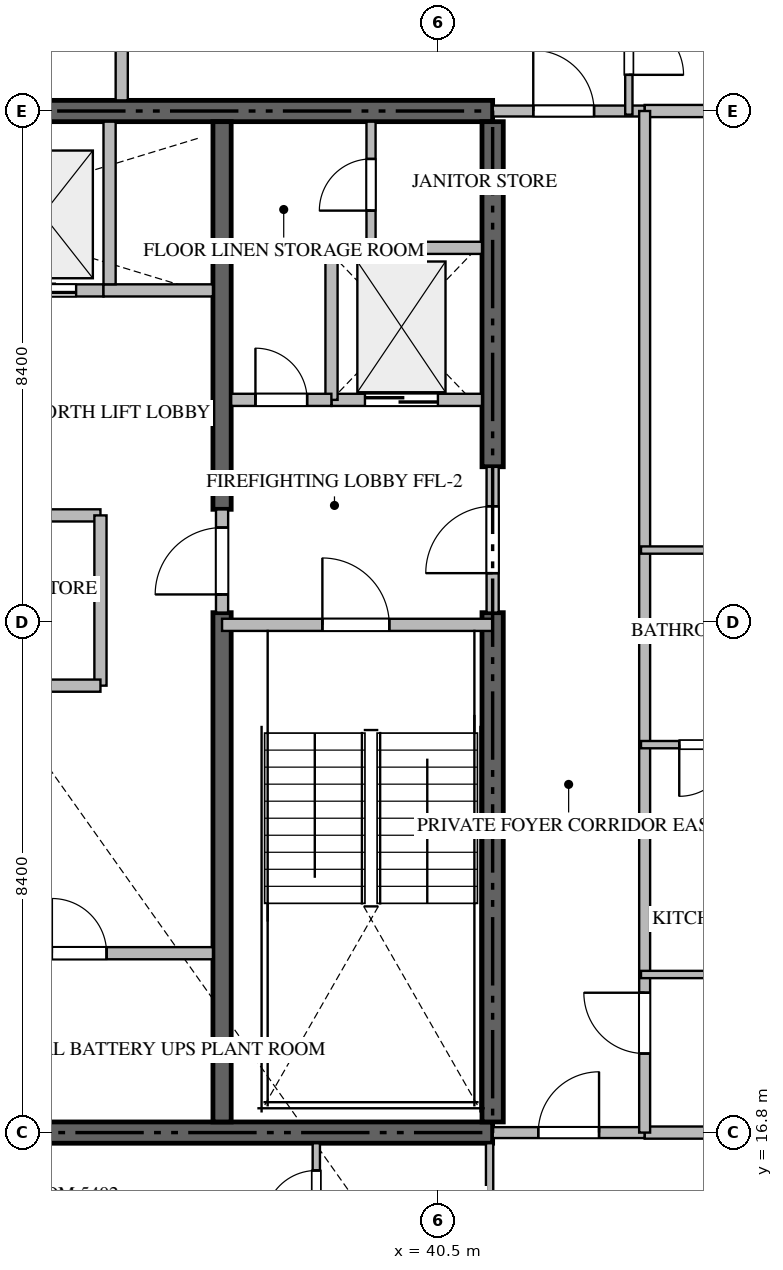
"""IFC4 building model, lengths in metres.
Left out: names, types, materials, properties, quantities, classifications, styles, units other than length and angle.
Written with IfcOpenShell. Run it as: python <this file> out.ifc"""

import sys

from ifc_helpers import new_model, si_unit, direction, frame, frame_2d, origin, place, context, subcontext, project, spatial, rectangle, extrude, source, transform, mapped, element, fill, save


model = new_model("IFC4")
c1 = context("Model", 3, precision=1e-05, world=origin(), true_north=direction((0.0, 1.0)))
c2 = subcontext(c1, "Body", "Model", "MODEL_VIEW")
j1 = project(units=[si_unit("LENGTHUNIT", "METRE"), si_unit("PLANEANGLEUNIT", "RADIAN")], contexts=[c1])
p1 = place(None, origin())
s1 = spatial("IfcSite", under=j1, at=p1, CompositionType="ELEMENT")
p2 = place(p1, origin())
s2 = spatial("IfcBuilding", under=s1, at=p2, CompositionType="ELEMENT")
p3 = place(p2, frame((0.0, 0.0, 218.15)))
s3 = spatial("IfcBuildingStorey", under=s2, at=p3, CompositionType="ELEMENT", Elevation=218.15)
for number, where, z_axis, x_axis in (
    (1, (23.4, 16.8, -0.26), (0.0, 0.0, 1.0), (1.0, 0.0, 0.0)),
    (2, (41.4, 33.6, -0.26), (0.0, 0.0, 1.0), (-1.0, 0.0, 0.0)),
):
    element("IfcWall", number, at=place(p3, frame(where, z_axis=z_axis, x_axis=x_axis)), inside=s3, PredefinedType="SHEAR", context=c2, shape_type="SweptSolid", body=[
        extrude(rectangle(XDim=18.0, YDim=0.35, at=frame_2d((9.0, 0.0))), origin(), (0.0, 0.0, 1.0), 3.848),
    ])
p4 = place(p3, frame((41.4, 16.975, -0.26), z_axis=(0.0, 0.0, 1.0), x_axis=(0.0, 1.0, 0.0)))
e3 = element("IfcWall", 3, at=p4, inside=s3, PredefinedType="SHEAR", context=c2, shape_type="SweptSolid", body=[
    extrude(rectangle(XDim=8.375, YDim=0.35, at=frame_2d((4.188, 0.0))), origin(), (0.0, 0.0, 1.0), 3.848),
])
p5 = place(p3, frame((41.4, 27.75, -0.26), z_axis=(0.0, 0.0, 1.0), x_axis=(0.0, 1.0, 0.0)))
e4 = element("IfcWall", 4, at=p5, inside=s3, PredefinedType="SHEAR", context=c2, shape_type="SweptSolid", body=[
    extrude(rectangle(XDim=5.675, YDim=0.35, at=frame_2d((2.837, 0.0))), origin(), (0.0, 0.0, 1.0), 3.848),
])
p6 = place(p3, frame((36.95, 16.975, -0.26), z_axis=(0.0, 0.0, 1.0), x_axis=(0.0, 1.0, 0.0)))
e5 = element("IfcWall", 5, at=p6, inside=s3, PredefinedType="SHEAR", context=c2, shape_type="SweptSolid", body=[
    extrude(rectangle(XDim=8.375, YDim=0.3, at=frame_2d((4.188, 0.0))), origin(), (0.0, 0.0, 1.0), 3.848),
])
p7 = place(p3, frame((36.95, 27.05, -0.26), z_axis=(0.0, 0.0, 1.0), x_axis=(0.0, 1.0, 0.0)))
e6 = element("IfcWall", 6, at=p7, inside=s3, PredefinedType="SHEAR", context=c2, shape_type="SweptSolid", body=[
    extrude(rectangle(XDim=6.375, YDim=0.3, at=frame_2d((3.188, 0.0))), origin(), (0.0, 0.0, 1.0), 3.848),
])
p8 = place(p3, frame((36.95, 25.15, 0.0), z_axis=(0.0, 0.0, 1.0), x_axis=(1.0, 0.0, 0.0)))
e7 = element("IfcWall", 7, at=p8, inside=s3, PredefinedType="STANDARD", context=c2, shape_type="SweptSolid", body=[
    extrude(rectangle(XDim=4.45, YDim=0.2, at=frame_2d((2.225, 0.0))), origin(), (0.0, 0.0, 1.0), 3.59),
])
p9 = place(p8, frame((1.65, 0.0, 0.0)))
e8 = element("IfcOpeningElement", 8, at=p9, cuts=e7, PredefinedType="OPENING", context=c2, shape_type="SweptSolid", body=[
    extrude(rectangle(XDim=1.1, YDim=2.15, at=frame_2d((0.55, 1.075))), frame((0.0, 0.11, 0.0), z_axis=(0.0, -1.0, 0.0), x_axis=(1.0, 0.0, 0.0)), (0.0, 0.0, 1.0), 0.22),
])
p10 = place(p3, frame((38.75, 28.85, 0.0), z_axis=(0.0, 0.0, 1.0), x_axis=(1.0, 0.0, 0.0)))
e9 = element("IfcWall", 9, at=p10, inside=s3, PredefinedType="STANDARD", context=c2, shape_type="SweptSolid", body=[
    extrude(rectangle(XDim=2.475, YDim=0.2, at=frame_2d((1.238, 0.0))), origin(), (0.0, 0.0, 1.0), 3.59),
])
p11 = place(p10, frame((0.55, 0.0, 0.0)))
e10 = element("IfcOpeningElement", 10, at=p11, cuts=e9, PredefinedType="OPENING", context=c2, shape_type="SweptSolid", body=[
    extrude(rectangle(XDim=1.2, YDim=2.2, at=frame_2d((0.6, 1.1))), frame((0.0, 0.11, 0.0), z_axis=(0.0, -1.0, 0.0), x_axis=(1.0, 0.0, 0.0)), (0.0, 0.0, 1.0), 0.22),
])
p12 = place(p3, frame((32.85, 30.65, 0.0), z_axis=(0.0, 0.0, 1.0), x_axis=(1.0, 0.0, 0.0)))
e11 = element("IfcWall", 11, at=p12, inside=s3, PredefinedType="STANDARD", context=c2, shape_type="SweptSolid", body=[
    extrude(rectangle(XDim=2.15, YDim=0.2, at=frame_2d((1.075, 0.0))), origin(), (0.0, 0.0, 1.0), 3.59),
])
p13 = place(p12, frame((0.6, 0.0, 0.0)))
e12 = element("IfcOpeningElement", 12, at=p13, cuts=e11, PredefinedType="OPENING", context=c2, shape_type="SweptSolid", body=[
    extrude(rectangle(XDim=1.1, YDim=2.2, at=frame_2d((0.55, 1.1))), frame((0.0, 0.11, 0.0), z_axis=(0.0, -1.0, 0.0), x_axis=(1.0, 0.0, 0.0)), (0.0, 0.0, 1.0), 0.22),
])
p14 = place(p3, frame((35.0, 30.65, 0.0), z_axis=(0.0, 0.0, 1.0), x_axis=(1.0, 0.0, 0.0)))
e13 = element("IfcWall", 13, at=p14, inside=s3, PredefinedType="STANDARD", context=c2, shape_type="SweptSolid", body=[
    extrude(rectangle(XDim=1.8, YDim=0.2, at=frame_2d((0.9, 0.0))), origin(), (0.0, 0.0, 1.0), 3.59),
])
p15 = place(p3, frame((35.1, 30.75, 0.0), z_axis=(0.0, 0.0, 1.0), x_axis=(0.0, 1.0, 0.0)))
e14 = element("IfcWall", 14, at=p15, inside=s3, PredefinedType="STANDARD", context=c2, shape_type="SweptSolid", body=[
    extrude(rectangle(XDim=2.675, YDim=0.2, at=frame_2d((1.337, 0.0))), origin(), (0.0, 0.0, 1.0), 3.59),
])
p16 = place(p3, frame((38.75, 28.85, 0.0), z_axis=(0.0, 0.0, 1.0), x_axis=(0.0, 1.0, 0.0)))
e15 = element("IfcWall", 15, at=p16, inside=s3, PredefinedType="STANDARD", context=c2, shape_type="SweptSolid", body=[
    extrude(rectangle(XDim=2.5, YDim=0.2, at=frame_2d((1.25, 0.0))), origin(), (0.0, 0.0, 1.0), 3.59),
])
p17 = place(p3, frame((38.75, 31.35, 0.0), z_axis=(0.0, 0.0, 1.0), x_axis=(1.0, 0.0, 0.0)))
e16 = element("IfcWall", 16, at=p17, inside=s3, PredefinedType="STANDARD", context=c2, shape_type="SweptSolid", body=[
    extrude(rectangle(XDim=2.475, YDim=0.2, at=frame_2d((1.238, 0.0))), origin(), (0.0, 0.0, 1.0), 3.59),
])
p18 = place(p3, frame((37.1, 28.85, 0.0), z_axis=(0.0, 0.0, 1.0), x_axis=(1.0, 0.0, 0.0)))
e17 = element("IfcWall", 17, at=p18, inside=s3, PredefinedType="STANDARD", context=c2, shape_type="SweptSolid", body=[
    extrude(rectangle(XDim=1.648, YDim=0.2, at=frame_2d((0.824, 0.0))), origin(), (0.0, 0.0, 1.0), 3.59),
])
p19 = place(p18, frame((0.399, 0.0, 0.0)))
e18 = element("IfcOpeningElement", 18, at=p19, cuts=e17, PredefinedType="OPENING", context=c2, shape_type="SweptSolid", body=[
    extrude(rectangle(XDim=0.85, YDim=2.1, at=frame_2d((0.425, 1.05))), frame((0.0, 0.11, 0.0), z_axis=(0.0, -1.0, 0.0), x_axis=(1.0, 0.0, 0.0)), (0.0, 0.0, 1.0), 0.22),
])
p20 = place(p3, frame((41.4, 25.352, 0.0), z_axis=(0.0, 0.0, 1.0), x_axis=(0.0, 1.0, 0.0)))
e19 = element("IfcWall", 19, at=p20, inside=s3, PredefinedType="STANDARD", context=c2, shape_type="SweptSolid", body=[
    extrude(rectangle(XDim=2.396, YDim=0.2, at=frame_2d((1.198, 0.0))), origin(), (0.0, 0.0, 1.0), 3.59),
])
p21 = place(p20, frame((0.648, 0.0, 0.0)))
e20 = element("IfcOpeningElement", 20, at=p21, cuts=e19, PredefinedType="OPENING", context=c2, shape_type="SweptSolid", body=[
    extrude(rectangle(XDim=1.1, YDim=2.15, at=frame_2d((0.55, 1.075))), frame((0.0, 0.11, 0.0), z_axis=(0.0, -1.0, 0.0), x_axis=(1.0, 0.0, 0.0)), (0.0, 0.0, 1.0), 0.22),
])
p22 = place(p3, frame((36.95, 25.352, 0.0), z_axis=(0.0, 0.0, 1.0), x_axis=(0.0, 1.0, 0.0)))
e21 = element("IfcWall", 21, at=p22, inside=s3, PredefinedType="STANDARD", context=c2, shape_type="SweptSolid", body=[
    extrude(rectangle(XDim=1.696, YDim=0.2, at=frame_2d((0.848, 0.0))), origin(), (0.0, 0.0, 1.0), 3.59),
])
p23 = place(p22, frame((0.298, 0.0, 0.0)))
e22 = element("IfcOpeningElement", 22, at=p23, cuts=e21, PredefinedType="OPENING", context=c2, shape_type="SweptSolid", body=[
    extrude(rectangle(XDim=1.1, YDim=2.15, at=frame_2d((0.55, 1.075))), frame((0.0, 0.11, 0.0), z_axis=(0.0, -1.0, 0.0), x_axis=(1.0, 0.0, 0.0)), (0.0, 0.0, 1.0), 0.22),
])
p24 = place(p3, frame((39.4, 31.35, 0.0), z_axis=(0.0, 0.0, 1.0), x_axis=(0.0, 1.0, 0.0)))
e23 = element("IfcWall", 23, at=p24, inside=s3, PredefinedType="PARTITIONING", context=c2, shape_type="SweptSolid", body=[
    extrude(rectangle(XDim=2.075, YDim=0.15, at=frame_2d((1.038, 0.0))), origin(), (0.0, 0.0, 1.0), 3.59),
])
p25 = place(p24, frame((0.612, 0.0, 0.0)))
e24 = element("IfcOpeningElement", 24, at=p25, cuts=e23, PredefinedType="OPENING", context=c2, shape_type="SweptSolid", body=[
    extrude(rectangle(XDim=0.85, YDim=2.1, at=frame_2d((0.425, 1.05))), frame((0.0, 0.085, 0.0), z_axis=(0.0, -1.0, 0.0), x_axis=(1.0, 0.0, 0.0)), (0.0, 0.0, 1.0), 0.17),
])
p26 = place(p3, frame((32.402, 19.75, 0.0), z_axis=(0.0, 0.0, 1.0), x_axis=(1.0, 0.0, 0.0)))
e25 = element("IfcWall", 25, at=p26, inside=s3, PredefinedType="STANDARD", context=c2, shape_type="SweptSolid", body=[
    extrude(rectangle(XDim=4.398, YDim=0.2, at=frame_2d((2.199, 0.0))), origin(), (0.0, 0.0, 1.0), 3.59),
])
p27 = place(p26, frame((1.749, 0.0, 0.0)))
e26 = element("IfcOpeningElement", 26, at=p27, cuts=e25, PredefinedType="OPENING", context=c2, shape_type="SweptSolid", body=[
    extrude(rectangle(XDim=0.9, YDim=2.1, at=frame_2d((0.45, 1.05))), frame((0.0, 0.11, 0.0), z_axis=(0.0, -1.0, 0.0), x_axis=(1.0, 0.0, 0.0)), (0.0, 0.0, 1.0), 0.22),
])
p28 = place(p3, frame((28.0, 26.95, 0.0), z_axis=(0.0, 0.0, 1.0), x_axis=(1.0, 0.0, 0.0)))
e27 = element("IfcWall", 27, at=p28, inside=s3, PredefinedType="STANDARD", context=c2, shape_type="SweptSolid", body=[
    extrude(rectangle(XDim=6.95, YDim=0.2, at=frame_2d((3.475, 0.0))), origin(), (0.0, 0.0, 1.0), 3.59),
])
p29 = place(p3, frame((34.95, 24.15, 0.0), z_axis=(0.0, 0.0, 1.0), x_axis=(0.0, 1.0, 0.0)))
e28 = element("IfcWall", 28, at=p29, inside=s3, PredefinedType="STANDARD", context=c2, shape_type="SweptSolid", body=[
    extrude(rectangle(XDim=2.8, YDim=0.2, at=frame_2d((1.4, 0.0))), origin(), (0.0, 0.0, 1.0), 3.59),
])
p30 = place(p3, frame((30.42, 24.15, 0.0), z_axis=(0.0, 0.0, 1.0), x_axis=(1.0, 0.0, 0.0)))
e29 = element("IfcWall", 29, at=p30, inside=s3, PredefinedType="STANDARD", context=c2, shape_type="SweptSolid", body=[
    extrude(rectangle(XDim=4.53, YDim=0.2, at=frame_2d((2.265, 0.0))), origin(), (0.0, 0.0, 1.0), 3.59),
])
p31 = place(p30, frame((1.815, 0.0, 0.0)))
e30 = element("IfcOpeningElement", 30, at=p31, cuts=e29, PredefinedType="OPENING", context=c2, shape_type="SweptSolid", body=[
    extrude(rectangle(XDim=0.9, YDim=2.1, at=frame_2d((0.45, 1.05))), frame((0.0, 0.11, 0.0), z_axis=(0.0, -1.0, 0.0), x_axis=(1.0, 0.0, 0.0)), (0.0, 0.0, 1.0), 0.22),
])
p32 = place(p3, frame((35.3, 33.775, 0.0), z_axis=(0.0, 0.0, 1.0), x_axis=(0.0, 1.0, 0.0)))
e31 = element("IfcWall", 31, at=p32, inside=s3, PredefinedType="PARTITIONING", context=c2, shape_type="SweptSolid", body=[
    extrude(rectangle(XDim=15.343, YDim=0.2, at=frame_2d((7.671, 0.0))), origin(), (0.0, 0.0, 1.0), 3.59),
])
for number, where, z_axis, x_axis in (
    (32, (43.9, 16.8, 0.0), (0.0, 0.0, 1.0), (1.0, 0.0, 0.0)),
    (33, (43.9, 33.6, 0.0), (0.0, 0.0, 1.0), (1.0, 0.0, 0.0)),
):
    element("IfcWall", number, at=place(p3, frame(where, z_axis=z_axis, x_axis=x_axis)), inside=s3, PredefinedType="PARTITIONING", context=c2, shape_type="SweptSolid", body=[
        extrude(rectangle(XDim=13.418, YDim=0.2, at=frame_2d((6.709, 0.0))), origin(), (0.0, 0.0, 1.0), 3.59),
    ])
p33 = place(p3, frame((41.402, 16.8, 0.0), z_axis=(0.0, 0.0, 1.0), x_axis=(1.0, 0.0, 0.0)))
e34 = element("IfcWall", 34, at=p33, inside=s3, PredefinedType="PARTITIONING", context=c2, shape_type="SweptSolid", body=[
    extrude(rectangle(XDim=2.496, YDim=0.18, at=frame_2d((1.248, 0.0))), origin(), (0.0, 0.0, 1.0), 3.59),
])
p34 = place(p33, frame((0.748, 0.0, 0.0)))
e35 = element("IfcOpeningElement", 35, at=p34, cuts=e34, PredefinedType="OPENING", context=c2, shape_type="SweptSolid", body=[
    extrude(rectangle(XDim=1.0, YDim=2.15, at=frame_2d((0.5, 1.075))), frame((0.0, 0.1, 0.0), z_axis=(0.0, -1.0, 0.0), x_axis=(1.0, 0.0, 0.0)), (0.0, 0.0, 1.0), 0.2),
])
p35 = place(p3, frame((41.402, 33.6, 0.0), z_axis=(0.0, 0.0, 1.0), x_axis=(1.0, 0.0, 0.0)))
e36 = element("IfcWall", 36, at=p35, inside=s3, PredefinedType="PARTITIONING", context=c2, shape_type="SweptSolid", body=[
    extrude(rectangle(XDim=2.496, YDim=0.18, at=frame_2d((1.248, 0.0))), origin(), (0.0, 0.0, 1.0), 3.59),
])
p36 = place(p35, frame((0.666, 0.0, 0.0)))
e37 = element("IfcOpeningElement", 37, at=p36, cuts=e36, PredefinedType="OPENING", context=c2, shape_type="SweptSolid", body=[
    extrude(rectangle(XDim=1.0, YDim=2.15, at=frame_2d((0.5, 1.075))), frame((0.0, 0.1, 0.0), z_axis=(0.0, -1.0, 0.0), x_axis=(1.0, 0.0, 0.0)), (0.0, 0.0, 1.0), 0.2),
])
p37 = place(p3, frame((43.9, 16.8, 0.0), z_axis=(0.0, 0.0, 1.0), x_axis=(0.0, 1.0, 0.0)))
e38 = element("IfcWall", 38, at=p37, inside=s3, PredefinedType="PARTITIONING", context=c2, shape_type="SweptSolid", body=[
    extrude(rectangle(XDim=16.8, YDim=0.18, at=frame_2d((8.4, 0.0))), origin(), (0.0, 0.0, 1.0), 3.59),
])
p38 = place(p37, frame((1.3, 0.0, 0.0)))
e39 = element("IfcOpeningElement", 39, at=p38, cuts=e38, PredefinedType="OPENING", context=c2, shape_type="SweptSolid", body=[
    extrude(rectangle(XDim=1.0, YDim=2.15, at=frame_2d((0.5, 1.075))), frame((0.0, 0.1, 0.0), z_axis=(0.0, -1.0, 0.0), x_axis=(1.0, 0.0, 0.0)), (0.0, 0.0, 1.0), 0.2),
])
p39 = place(p3, frame((41.35, 14.05, 0.0), z_axis=(0.0, 0.0, 1.0), x_axis=(0.0, 1.0, 0.0)))
e40 = element("IfcWall", 40, at=p39, inside=s3, PredefinedType="PARTITIONING", context=c2, shape_type="SweptSolid", body=[
    extrude(rectangle(XDim=2.575, YDim=0.12, at=frame_2d((1.288, 0.0))), origin(), (0.0, 0.0, 1.0), 3.59),
])
p40 = place(p3, frame((38.5, 14.752, 0.0), z_axis=(0.0, 0.0, 1.0), x_axis=(0.0, 1.0, 0.0)))
e41 = element("IfcWall", 41, at=p40, inside=s3, PredefinedType="PARTITIONING", context=c2, shape_type="SweptSolid", body=[
    extrude(rectangle(XDim=1.873, YDim=0.12, at=frame_2d((0.937, 0.0))), origin(), (0.0, 0.0, 1.0), 3.59),
])
p41 = place(p40, frame((0.575, 0.0, 0.0)))
e42 = element("IfcOpeningElement", 42, at=p41, cuts=e41, PredefinedType="OPENING", context=c2, shape_type="SweptSolid", body=[
    extrude(rectangle(XDim=0.85, YDim=2.1, at=frame_2d((0.425, 1.05))), frame((0.0, 0.07, 0.0), z_axis=(0.0, -1.0, 0.0), x_axis=(1.0, 0.0, 0.0)), (0.0, 0.0, 1.0), 0.14),
])
p42 = place(p3, frame((43.64, 35.75, 0.0), z_axis=(0.0, 0.0, 1.0), x_axis=(0.0, -1.0, 0.0)))
e43 = element("IfcWall", 43, at=p42, inside=s3, PredefinedType="PARTITIONING", context=c2, shape_type="SweptSolid", body=[
    extrude(rectangle(XDim=2.21, YDim=0.12, at=frame_2d((1.105, 0.0))), origin(), (0.0, 0.0, 1.0), 3.59),
])
p43 = place(p42, frame((0.655, 0.0, 0.0)))
e44 = element("IfcOpeningElement", 44, at=p43, cuts=e43, PredefinedType="OPENING", context=c2, shape_type="SweptSolid", body=[
    extrude(rectangle(XDim=0.9, YDim=2.1, at=frame_2d((0.45, 1.05))), frame((0.0, 0.07, 0.0), z_axis=(0.0, -1.0, 0.0), x_axis=(1.0, 0.0, 0.0)), (0.0, 0.0, 1.0), 0.14),
])
p44 = place(p3, frame((46.65, 19.4, 0.0), z_axis=(0.0, 0.0, 1.0), x_axis=(-1.0, 0.0, 0.0)))
e45 = element("IfcWall", 45, at=p44, inside=s3, PredefinedType="PARTITIONING", context=c2, shape_type="SweptSolid", body=[
    extrude(rectangle(XDim=2.81, YDim=0.12, at=frame_2d((1.405, 0.0))), origin(), (0.0, 0.0, 1.0), 3.59),
])
p45 = place(p3, frame((45.95, 26.38, 0.0), z_axis=(0.0, 0.0, 1.0), x_axis=(-1.0, 0.0, 0.0)))
e46 = element("IfcWall", 46, at=p45, inside=s3, PredefinedType="PARTITIONING", context=c2, shape_type="SweptSolid", body=[
    extrude(rectangle(XDim=2.11, YDim=0.12, at=frame_2d((1.055, 0.0))), origin(), (0.0, 0.0, 1.0), 3.59),
])
p46 = place(p3, frame((45.948, 23.18, 0.0), z_axis=(0.0, 0.0, 1.0), x_axis=(-1.0, 0.0, 0.0)))
e47 = element("IfcWall", 47, at=p46, inside=s3, PredefinedType="PARTITIONING", context=c2, shape_type="SweptSolid", body=[
    extrude(rectangle(XDim=2.108, YDim=0.12, at=frame_2d((1.054, 0.0))), origin(), (0.0, 0.0, 1.0), 3.59),
])
p47 = place(p46, frame((0.629, 0.0, 0.0)))
e48 = element("IfcOpeningElement", 48, at=p47, cuts=e47, PredefinedType="OPENING", context=c2, shape_type="SweptSolid", body=[
    extrude(rectangle(XDim=0.85, YDim=2.1, at=frame_2d((0.425, 1.05))), frame((0.0, 0.07, 0.0), z_axis=(0.0, -1.0, 0.0), x_axis=(1.0, 0.0, 0.0)), (0.0, 0.0, 1.0), 0.14),
])
m1 = source(origin(), c2, "Body", "SweptSolid", [
    extrude(rectangle(XDim=1.1, YDim=2.15, at=frame_2d((0.55, 1.075))), frame((0.0, 0.025, 0.0), z_axis=(0.0, -1.0, 0.0), x_axis=(1.0, 0.0, 0.0)), (0.0, 0.0, 1.0), 0.05),
])
p48 = place(p9, origin())
e49 = element("IfcDoor", 49, at=p48, inside=s3, OperationType="SINGLE_SWING_LEFT", PredefinedType="DOOR", context=c2, shape_type="MappedRepresentation", body=[
    mapped(m1, transform((0.0, 0.0, 0.0), scale=1.0)),
])
fill(e8, e49)
m2 = source(origin(), c2, "Body", "SweptSolid", [
    extrude(rectangle(XDim=1.2, YDim=2.2, at=frame_2d((0.6, 1.1))), frame((0.0, 0.025, 0.0), z_axis=(0.0, -1.0, 0.0), x_axis=(1.0, 0.0, 0.0)), (0.0, 0.0, 1.0), 0.05),
])
p49 = place(p11, origin())
e50 = element("IfcDoor", 50, at=p49, inside=s3, OperationType="DOUBLE_DOOR_SLIDING", PredefinedType="DOOR", context=c2, shape_type="MappedRepresentation", body=[
    mapped(m2, transform((0.0, 0.0, 0.0), scale=1.0)),
])
fill(e10, e50)
m3 = source(origin(), c2, "Body", "SweptSolid", [
    extrude(rectangle(XDim=1.1, YDim=2.2, at=frame_2d((0.55, 1.1))), frame((0.0, 0.025, 0.0), z_axis=(0.0, -1.0, 0.0), x_axis=(1.0, 0.0, 0.0)), (0.0, 0.0, 1.0), 0.05),
])
p50 = place(p13, origin())
e51 = element("IfcDoor", 51, at=p50, inside=s3, OperationType="DOUBLE_DOOR_SLIDING", PredefinedType="DOOR", context=c2, shape_type="MappedRepresentation", body=[
    mapped(m3, transform((0.0, 0.0, 0.0), scale=1.0)),
])
fill(e12, e51)
m4 = source(origin(), c2, "Body", "SweptSolid", [
    extrude(rectangle(XDim=0.85, YDim=2.1, at=frame_2d((0.425, 1.05))), frame((0.0, 0.025, 0.0), z_axis=(0.0, -1.0, 0.0), x_axis=(1.0, 0.0, 0.0)), (0.0, 0.0, 1.0), 0.05),
])
p51 = place(p19, origin())
e52 = element("IfcDoor", 52, at=p51, inside=s3, OperationType="SINGLE_SWING_LEFT", PredefinedType="DOOR", context=c2, shape_type="MappedRepresentation", body=[
    mapped(m4, transform((0.0, 0.0, 0.0), scale=1.0)),
])
fill(e18, e52)
p52 = place(p21, origin())
e53 = element("IfcDoor", 53, at=p52, inside=s3, OperationType="SINGLE_SWING_LEFT", PredefinedType="DOOR", context=c2, shape_type="MappedRepresentation", body=[
    mapped(m1, transform((0.0, 0.0, 0.0), scale=1.0)),
])
fill(e20, e53)
p53 = place(p23, origin())
e54 = element("IfcDoor", 54, at=p53, inside=s3, OperationType="SINGLE_SWING_LEFT", PredefinedType="DOOR", context=c2, shape_type="MappedRepresentation", body=[
    mapped(m1, transform((0.0, 0.0, 0.0), scale=1.0)),
])
fill(e22, e54)
p54 = place(p25, origin())
e55 = element("IfcDoor", 55, at=p54, inside=s3, OperationType="SINGLE_SWING_LEFT", PredefinedType="DOOR", context=c2, shape_type="MappedRepresentation", body=[
    mapped(m4, transform((0.0, 0.0, 0.0), scale=1.0)),
])
fill(e24, e55)
m5 = source(origin(), c2, "Body", "SweptSolid", [
    extrude(rectangle(XDim=0.9, YDim=2.1, at=frame_2d((0.45, 1.05))), frame((0.0, 0.025, 0.0), z_axis=(0.0, -1.0, 0.0), x_axis=(1.0, 0.0, 0.0)), (0.0, 0.0, 1.0), 0.05),
])
p55 = place(p27, origin())
e56 = element("IfcDoor", 56, at=p55, inside=s3, OperationType="SINGLE_SWING_LEFT", PredefinedType="DOOR", context=c2, shape_type="MappedRepresentation", body=[
    mapped(m5, transform((0.0, 0.0, 0.0), scale=1.0)),
])
fill(e26, e56)
m6 = source(origin(), c2, "Body", "SweptSolid", [
    extrude(rectangle(XDim=1.0, YDim=2.15, at=frame_2d((0.5, 1.075))), frame((0.0, 0.025, 0.0), z_axis=(0.0, -1.0, 0.0), x_axis=(1.0, 0.0, 0.0)), (0.0, 0.0, 1.0), 0.05),
])
p56 = place(p34, origin())
e57 = element("IfcDoor", 57, at=p56, inside=s3, OperationType="SINGLE_SWING_RIGHT", PredefinedType="DOOR", context=c2, shape_type="MappedRepresentation", body=[
    mapped(m6, transform((0.0, 0.0, 0.0), scale=1.0)),
])
fill(e35, e57)
p57 = place(p36, origin())
e58 = element("IfcDoor", 58, at=p57, inside=s3, OperationType="SINGLE_SWING_LEFT", PredefinedType="DOOR", context=c2, shape_type="MappedRepresentation", body=[
    mapped(m6, transform((0.0, 0.0, 0.0), scale=1.0)),
])
fill(e37, e58)
p58 = place(p38, origin())
e59 = element("IfcDoor", 59, at=p58, inside=s3, OperationType="SINGLE_SWING_RIGHT", PredefinedType="DOOR", context=c2, shape_type="MappedRepresentation", body=[
    mapped(m6, transform((0.0, 0.0, 0.0), scale=1.0)),
])
fill(e39, e59)
p59 = place(p41, origin())
e60 = element("IfcDoor", 60, at=p59, inside=s3, OperationType="SINGLE_SWING_LEFT", PredefinedType="DOOR", context=c2, shape_type="MappedRepresentation", body=[
    mapped(m4, transform((0.0, 0.0, 0.0), scale=1.0)),
])
fill(e42, e60)
p60 = place(p43, origin())
e61 = element("IfcDoor", 61, at=p60, inside=s3, OperationType="SINGLE_SWING_RIGHT", PredefinedType="DOOR", context=c2, shape_type="MappedRepresentation", body=[
    mapped(m5, transform((0.0, 0.0, 0.0), scale=1.0)),
])
fill(e44, e61)
p61 = place(p47, origin())
e62 = element("IfcDoor", 62, at=p61, inside=s3, OperationType="SINGLE_SWING_RIGHT", PredefinedType="DOOR", context=c2, shape_type="MappedRepresentation", body=[
    mapped(m4, transform((0.0, 0.0, 0.0), scale=1.0)),
])
fill(e48, e62)
save(model, sys.argv[1])
